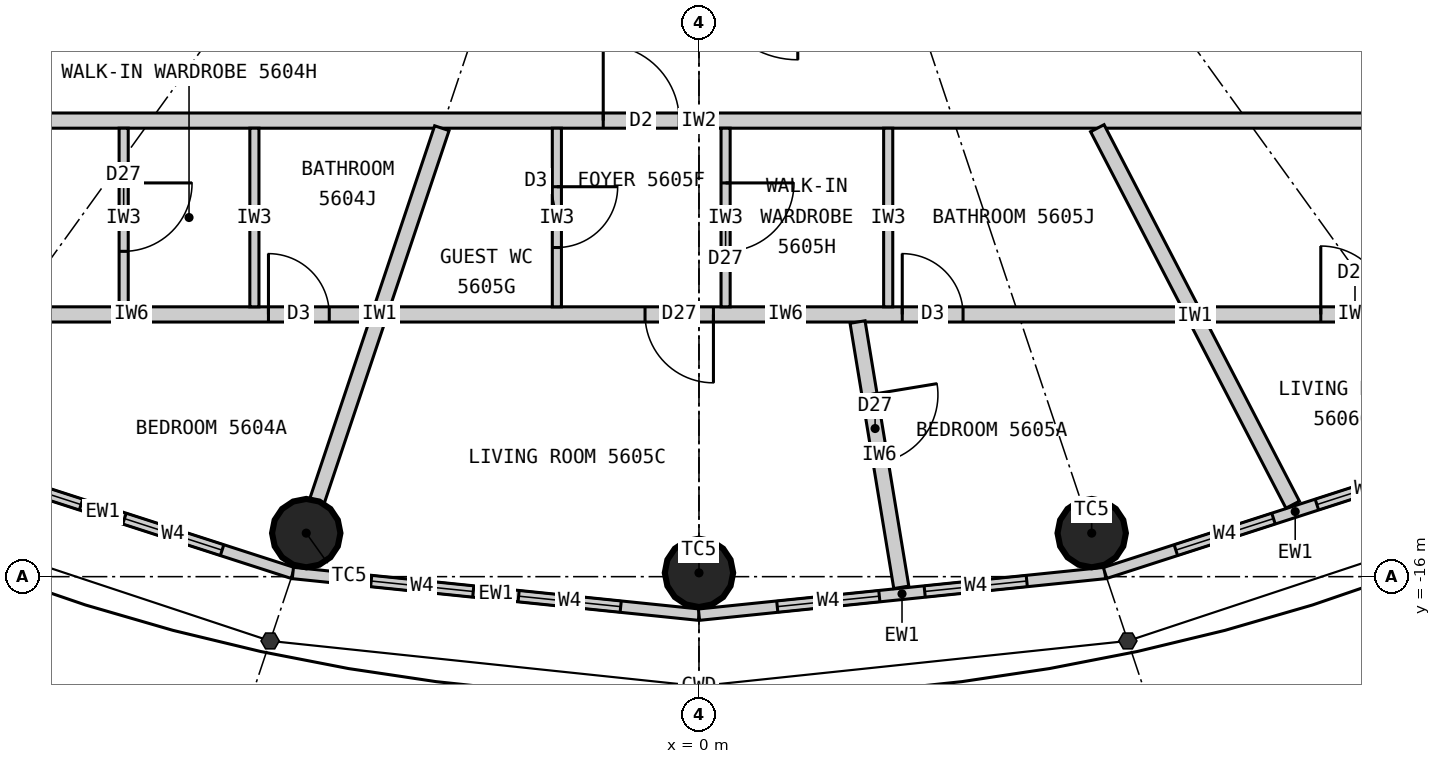
"""IFC4 building model, lengths in metres.
Left out: names, types, materials, properties, quantities, classifications, styles, units other than length and angle.
Written with IfcOpenShell. Run it as: python <this file> out.ifc"""

import sys

from ifc_helpers import new_model, si_unit, direction, frame, frame_2d, origin, origin_2d, place, context, subcontext, project, spatial, rectangle, circle, extrude, element, fill, save


model = new_model("IFC4")
c1 = context("Model", 3, precision=1e-05, world=origin(), true_north=direction((0.0, 1.0)))
c2 = subcontext(c1, "Body", "Model", "MODEL_VIEW")
j1 = project(units=[si_unit("LENGTHUNIT", "METRE"), si_unit("PLANEANGLEUNIT", "RADIAN")], contexts=[c1])
p1 = place(None, origin())
s1 = spatial("IfcSite", under=j1, at=p1, CompositionType="ELEMENT")
p2 = place(p1, origin())
s2 = spatial("IfcBuilding", under=s1, at=p2, CompositionType="ELEMENT")
p3 = place(p2, frame((0.0, 0.0, 209.4)))
s3 = spatial("IfcBuildingStorey", under=s2, at=p3, CompositionType="ELEMENT", Elevation=209.4)
for number, where, z_axis, x_axis in (
    (1, (-5.167, -15.427, 0.0), (0.0, 0.0, 1.0), (1.0, 0.0, 0.0)),
    (2, (0.0, -15.95, 0.0), (0.0, 0.0, 1.0), (1.0, 0.0, 0.0)),
    (3, (5.167, -15.427, 0.0), (0.0, 0.0, 1.0), (1.0, 0.0, 0.0)),
):
    element("IfcColumn", number, at=place(p3, frame(where, z_axis=z_axis, x_axis=x_axis)), inside=s3, PredefinedType="COLUMN", context=c2, shape_type="SweptSolid", body=[
        extrude(circle(Radius=0.45, at=origin_2d()), origin(), (0.0, 0.0, 1.0), 3.3),
    ])
p4 = place(p3, frame((-10.346, -14.336, 0.0), z_axis=(0.0, 0.0, 1.0), x_axis=(0.951644702515, -0.307200846638, 0.0)))
e4 = element("IfcWall", 4, at=p4, inside=s3, PredefinedType="ELEMENTEDWALL", context=c2, shape_type="SweptSolid", body=[
    extrude(rectangle(XDim=5.258, YDim=0.15, at=frame_2d((2.629, 0.0))), origin(), (0.0, 0.0, 1.0), 3.12),
])
p5 = place(p4, frame((0.979, 0.0, 0.9)))
e5 = element("IfcOpeningElement", 5, at=p5, cuts=e4, PredefinedType="OPENING", context=c2, shape_type="SweptSolid", body=[
    extrude(rectangle(XDim=1.35, YDim=1.9, at=frame_2d((0.675, 0.95))), frame((0.0, 0.085, 0.0), z_axis=(0.0, -1.0, 0.0), x_axis=(1.0, 0.0, 0.0)), (0.0, 0.0, 1.0), 0.17),
])
p6 = place(p4, frame((2.929, 0.0, 0.9)))
e6 = element("IfcOpeningElement", 6, at=p6, cuts=e4, PredefinedType="OPENING", context=c2, shape_type="SweptSolid", body=[
    extrude(rectangle(XDim=1.35, YDim=1.9, at=frame_2d((0.675, 0.95))), frame((0.0, 0.085, 0.0), z_axis=(0.0, -1.0, 0.0), x_axis=(1.0, 0.0, 0.0)), (0.0, 0.0, 1.0), 0.17),
])
p7 = place(p3, frame((-5.343, -15.952, 0.0), z_axis=(0.0, 0.0, 1.0), x_axis=(0.994774574972, -0.102095763818, 0.0)))
e7 = element("IfcWall", 7, at=p7, inside=s3, PredefinedType="ELEMENTEDWALL", context=c2, shape_type="SweptSolid", body=[
    extrude(rectangle(XDim=5.371, YDim=0.15, at=frame_2d((2.686, 0.0))), origin(), (0.0, 0.0, 1.0), 3.12),
])
p8 = place(p7, frame((1.035, 0.0, 0.9)))
e8 = element("IfcOpeningElement", 8, at=p8, cuts=e7, PredefinedType="OPENING", context=c2, shape_type="SweptSolid", body=[
    extrude(rectangle(XDim=1.35, YDim=1.9, at=frame_2d((0.675, 0.95))), frame((0.0, 0.085, 0.0), z_axis=(0.0, -1.0, 0.0), x_axis=(1.0, 0.0, 0.0)), (0.0, 0.0, 1.0), 0.17),
])
p9 = place(p7, frame((2.985, 0.0, 0.9)))
e9 = element("IfcOpeningElement", 9, at=p9, cuts=e7, PredefinedType="OPENING", context=c2, shape_type="SweptSolid", body=[
    extrude(rectangle(XDim=1.35, YDim=1.9, at=frame_2d((0.675, 0.95))), frame((0.0, 0.085, 0.0), z_axis=(0.0, -1.0, 0.0), x_axis=(1.0, 0.0, 0.0)), (0.0, 0.0, 1.0), 0.17),
])
p10 = place(p3, frame((0.0, -16.5, 0.0), z_axis=(0.0, 0.0, 1.0), x_axis=(0.994774574972, 0.102095763818, 0.0)))
e10 = element("IfcWall", 10, at=p10, inside=s3, PredefinedType="ELEMENTEDWALL", context=c2, shape_type="SweptSolid", body=[
    extrude(rectangle(XDim=5.371, YDim=0.15, at=frame_2d((2.686, 0.0))), origin(), (0.0, 0.0, 1.0), 3.12),
])
p11 = place(p10, frame((1.035, 0.0, 0.9)))
e11 = element("IfcOpeningElement", 11, at=p11, cuts=e10, PredefinedType="OPENING", context=c2, shape_type="SweptSolid", body=[
    extrude(rectangle(XDim=1.35, YDim=1.9, at=frame_2d((0.675, 0.95))), frame((0.0, 0.085, 0.0), z_axis=(0.0, -1.0, 0.0), x_axis=(1.0, 0.0, 0.0)), (0.0, 0.0, 1.0), 0.17),
])
p12 = place(p10, frame((2.985, 0.0, 0.9)))
e12 = element("IfcOpeningElement", 12, at=p12, cuts=e10, PredefinedType="OPENING", context=c2, shape_type="SweptSolid", body=[
    extrude(rectangle(XDim=1.35, YDim=1.9, at=frame_2d((0.675, 0.95))), frame((0.0, 0.085, 0.0), z_axis=(0.0, -1.0, 0.0), x_axis=(1.0, 0.0, 0.0)), (0.0, 0.0, 1.0), 0.17),
])
p13 = place(p3, frame((5.343, -15.952, 0.0), z_axis=(0.0, 0.0, 1.0), x_axis=(0.951644702515, 0.307200846638, 0.0)))
e13 = element("IfcWall", 13, at=p13, inside=s3, PredefinedType="ELEMENTEDWALL", context=c2, shape_type="SweptSolid", body=[
    extrude(rectangle(XDim=5.258, YDim=0.15, at=frame_2d((2.629, 0.0))), origin(), (0.0, 0.0, 1.0), 3.12),
])
p14 = place(p13, frame((0.979, 0.0, 0.9)))
e14 = element("IfcOpeningElement", 14, at=p14, cuts=e13, PredefinedType="OPENING", context=c2, shape_type="SweptSolid", body=[
    extrude(rectangle(XDim=1.35, YDim=1.9, at=frame_2d((0.675, 0.95))), frame((0.0, 0.085, 0.0), z_axis=(0.0, -1.0, 0.0), x_axis=(1.0, 0.0, 0.0)), (0.0, 0.0, 1.0), 0.17),
])
p15 = place(p13, frame((2.929, 0.0, 0.9)))
e15 = element("IfcOpeningElement", 15, at=p15, cuts=e13, PredefinedType="OPENING", context=c2, shape_type="SweptSolid", body=[
    extrude(rectangle(XDim=1.35, YDim=1.9, at=frame_2d((0.675, 0.95))), frame((0.0, 0.085, 0.0), z_axis=(0.0, -1.0, 0.0), x_axis=(1.0, 0.0, 0.0)), (0.0, 0.0, 1.0), 0.17),
])
p16 = place(p3, frame((11.1, -10.0, 0.0), z_axis=(0.0, 0.0, 1.0), x_axis=(-1.0, 0.0, 0.0)))
e16 = element("IfcWall", 16, at=p16, inside=s3, PredefinedType="PARTITIONING", context=c2, shape_type="SweptSolid", body=[
    extrude(rectangle(XDim=22.2, YDim=0.2, at=frame_2d((11.1, 0.0))), origin(), (0.0, 0.0, 1.0), 3.12),
])
p17 = place(p16, frame((11.36, 0.0, 0.0)))
e17 = element("IfcOpeningElement", 17, at=p17, cuts=e16, PredefinedType="OPENING", context=c2, shape_type="SweptSolid", body=[
    extrude(rectangle(XDim=1.0, YDim=2.2, at=frame_2d((0.5, 1.1))), frame((0.0, 0.11, 0.0), z_axis=(0.0, -1.0, 0.0), x_axis=(1.0, 0.0, 0.0)), (0.0, 0.0, 1.0), 0.22),
])
p18 = place(p16, frame((0.595, 0.0, 0.0)))
e18 = element("IfcOpeningElement", 18, at=p18, cuts=e16, PredefinedType="OPENING", context=c2, shape_type="SweptSolid", body=[
    extrude(rectangle(XDim=1.0, YDim=2.2, at=frame_2d((0.5, 1.1))), frame((0.0, 0.11, 0.0), z_axis=(0.0, -1.0, 0.0), x_axis=(1.0, 0.0, 0.0)), (0.0, 0.0, 1.0), 0.22),
])
p19 = place(p3, frame((-3.383, -10.1, 0.0), z_axis=(0.0, 0.0, 1.0), x_axis=(-0.317602151035, -0.948224063003, 0.0)))
e19 = element("IfcWall", 19, at=p19, inside=s3, PredefinedType="PARTITIONING", context=c2, shape_type="SweptSolid", body=[
    extrude(rectangle(XDim=5.168, YDim=0.2, at=frame_2d((2.584, 0.0))), origin(), (0.0, 0.0, 1.0), 2.42),
])
p20 = place(p3, frame((5.241, -10.1, 0.0), z_axis=(0.0, 0.0, 1.0), x_axis=(0.460603196597, -0.887606160008, 0.0)))
e20 = element("IfcWall", 20, at=p20, inside=s3, PredefinedType="PARTITIONING", context=c2, shape_type="SweptSolid", body=[
    extrude(rectangle(XDim=5.58, YDim=0.2, at=frame_2d((2.79, 0.0))), origin(), (0.0, 0.0, 1.0), 3.12),
])
p21 = place(p3, frame((-10.609, -12.55, 0.0), z_axis=(0.0, 0.0, 1.0), x_axis=(1.0, 0.0, 0.0)))
e21 = element("IfcWall", 21, at=p21, inside=s3, PredefinedType="PARTITIONING", context=c2, shape_type="SweptSolid", body=[
    extrude(rectangle(XDim=6.284, YDim=0.2, at=frame_2d((3.142, 0.0))), origin(), (0.0, 0.0, 1.0), 3.12),
])
p22 = place(p21, frame((4.944, 0.0, 0.0)))
e22 = element("IfcOpeningElement", 22, at=p22, cuts=e21, PredefinedType="OPENING", context=c2, shape_type="SweptSolid", body=[
    extrude(rectangle(XDim=0.8, YDim=2.1, at=frame_2d((0.4, 1.05))), frame((0.0, 0.11, 0.0), z_axis=(0.0, -1.0, 0.0), x_axis=(1.0, 0.0, 0.0)), (0.0, 0.0, 1.0), 0.22),
])
p23 = place(p3, frame((-7.569, -10.1, 0.0), z_axis=(0.0, 0.0, 1.0), x_axis=(0.0, -1.0, 0.0)))
e23 = element("IfcWall", 23, at=p23, inside=s3, PredefinedType="PARTITIONING", context=c2, shape_type="SweptSolid", body=[
    extrude(rectangle(XDim=2.35, YDim=0.12, at=frame_2d((1.175, 0.0))), origin(), (0.0, 0.0, 1.0), 3.12),
])
p24 = place(p23, frame((0.72, 0.0, 0.0)))
e24 = element("IfcOpeningElement", 24, at=p24, cuts=e23, PredefinedType="OPENING", context=c2, shape_type="SweptSolid", body=[
    extrude(rectangle(XDim=0.9, YDim=2.1, at=frame_2d((0.45, 1.05))), frame((0.0, 0.07, 0.0), z_axis=(0.0, -1.0, 0.0), x_axis=(1.0, 0.0, 0.0)), (0.0, 0.0, 1.0), 0.14),
])
p25 = place(p3, frame((-5.849, -10.1, 0.0), z_axis=(0.0, 0.0, 1.0), x_axis=(0.0, -1.0, 0.0)))
e25 = element("IfcWall", 25, at=p25, inside=s3, PredefinedType="PARTITIONING", context=c2, shape_type="SweptSolid", body=[
    extrude(rectangle(XDim=2.35, YDim=0.12, at=frame_2d((1.175, 0.0))), origin(), (0.0, 0.0, 1.0), 3.12),
])
p26 = place(p3, frame((-4.082, -12.55, 0.0), z_axis=(0.0, 0.0, 1.0), x_axis=(1.0, 0.0, 0.0)))
e26 = element("IfcWall", 26, at=p26, inside=s3, PredefinedType="PARTITIONING", context=c2, shape_type="SweptSolid", body=[
    extrude(rectangle(XDim=10.446, YDim=0.2, at=frame_2d((5.223, 0.0))), origin(), (0.0, 0.0, 1.0), 3.12),
])
p27 = place(p26, frame((6.757, 0.0, 0.0)))
e27 = element("IfcOpeningElement", 27, at=p27, cuts=e26, PredefinedType="OPENING", context=c2, shape_type="SweptSolid", body=[
    extrude(rectangle(XDim=0.8, YDim=2.1, at=frame_2d((0.4, 1.05))), frame((0.0, 0.11, 0.0), z_axis=(0.0, -1.0, 0.0), x_axis=(1.0, 0.0, 0.0)), (0.0, 0.0, 1.0), 0.22),
])
p28 = place(p26, frame((3.372, 0.0, 0.0)))
e28 = element("IfcOpeningElement", 28, at=p28, cuts=e26, PredefinedType="OPENING", context=c2, shape_type="SweptSolid", body=[
    extrude(rectangle(XDim=0.9, YDim=2.1, at=frame_2d((0.45, 1.05))), frame((0.0, 0.11, 0.0), z_axis=(0.0, -1.0, 0.0), x_axis=(1.0, 0.0, 0.0)), (0.0, 0.0, 1.0), 0.22),
])
p29 = place(p3, frame((2.086, -12.65, 0.0), z_axis=(0.0, 0.0, 1.0), x_axis=(0.162664077359, -0.986681507852, 0.0)))
e29 = element("IfcWall", 29, at=p29, inside=s3, PredefinedType="PARTITIONING", context=c2, shape_type="SweptSolid", body=[
    extrude(rectangle(XDim=3.538, YDim=0.2, at=frame_2d((1.769, 0.0))), origin(), (0.0, 0.0, 1.0), 3.12),
])
p30 = place(p29, frame((0.97, 0.0, 0.0)))
e30 = element("IfcOpeningElement", 30, at=p30, cuts=e29, PredefinedType="OPENING", context=c2, shape_type="SweptSolid", body=[
    extrude(rectangle(XDim=0.9, YDim=2.1, at=frame_2d((0.45, 1.05))), frame((0.0, 0.11, 0.0), z_axis=(0.0, -1.0, 0.0), x_axis=(1.0, 0.0, 0.0)), (0.0, 0.0, 1.0), 0.22),
])
p31 = place(p3, frame((-1.87, -10.1, 0.0), z_axis=(0.0, 0.0, 1.0), x_axis=(0.0, -1.0, 0.0)))
e31 = element("IfcWall", 31, at=p31, inside=s3, PredefinedType="PARTITIONING", context=c2, shape_type="SweptSolid", body=[
    extrude(rectangle(XDim=2.35, YDim=0.12, at=frame_2d((1.175, 0.0))), origin(), (0.0, 0.0, 1.0), 3.12),
])
p32 = place(p31, frame((0.77, 0.0, 0.0)))
e32 = element("IfcOpeningElement", 32, at=p32, cuts=e31, PredefinedType="OPENING", context=c2, shape_type="SweptSolid", body=[
    extrude(rectangle(XDim=0.8, YDim=2.1, at=frame_2d((0.4, 1.05))), frame((0.0, 0.07, 0.0), z_axis=(0.0, -1.0, 0.0), x_axis=(1.0, 0.0, 0.0)), (0.0, 0.0, 1.0), 0.14),
])
p33 = place(p3, frame((0.35, -10.1, 0.0), z_axis=(0.0, 0.0, 1.0), x_axis=(0.0, -1.0, 0.0)))
e33 = element("IfcWall", 33, at=p33, inside=s3, PredefinedType="PARTITIONING", context=c2, shape_type="SweptSolid", body=[
    extrude(rectangle(XDim=2.35, YDim=0.12, at=frame_2d((1.175, 0.0))), origin(), (0.0, 0.0, 1.0), 3.12),
])
p34 = place(p33, frame((0.72, 0.0, 0.0)))
e34 = element("IfcOpeningElement", 34, at=p34, cuts=e33, PredefinedType="OPENING", context=c2, shape_type="SweptSolid", body=[
    extrude(rectangle(XDim=0.9, YDim=2.1, at=frame_2d((0.45, 1.05))), frame((0.0, 0.07, 0.0), z_axis=(0.0, -1.0, 0.0), x_axis=(1.0, 0.0, 0.0)), (0.0, 0.0, 1.0), 0.14),
])
p35 = place(p3, frame((2.49, -10.1, 0.0), z_axis=(0.0, 0.0, 1.0), x_axis=(0.0, -1.0, 0.0)))
e35 = element("IfcWall", 35, at=p35, inside=s3, PredefinedType="PARTITIONING", context=c2, shape_type="SweptSolid", body=[
    extrude(rectangle(XDim=2.35, YDim=0.12, at=frame_2d((1.175, 0.0))), origin(), (0.0, 0.0, 1.0), 3.12),
])
p36 = place(p3, frame((6.661, -12.55, 0.0), z_axis=(0.0, 0.0, 1.0), x_axis=(1.0, 0.0, 0.0)))
e36 = element("IfcWall", 36, at=p36, inside=s3, PredefinedType="PARTITIONING", context=c2, shape_type="SweptSolid", body=[
    extrude(rectangle(XDim=3.947, YDim=0.2, at=frame_2d((1.974, 0.0))), origin(), (0.0, 0.0, 1.0), 3.12),
])
p37 = place(p36, frame((1.52, 0.0, 0.0)))
e37 = element("IfcOpeningElement", 37, at=p37, cuts=e36, PredefinedType="OPENING", context=c2, shape_type="SweptSolid", body=[
    extrude(rectangle(XDim=0.9, YDim=2.1, at=frame_2d((0.45, 1.05))), frame((0.0, 0.11, 0.0), z_axis=(0.0, -1.0, 0.0), x_axis=(1.0, 0.0, 0.0)), (0.0, 0.0, 1.0), 0.22),
])
p38 = place(p5, origin())
e38 = element("IfcWindow", 38, at=p38, inside=s3, PartitioningType="SINGLE_PANEL", PredefinedType="WINDOW", context=c2, shape_type="SweptSolid", body=[
    extrude(rectangle(XDim=1.35, YDim=1.9, at=frame_2d((0.675, 0.95))), frame((0.0, 0.03, 0.0), z_axis=(0.0, -1.0, 0.0), x_axis=(1.0, 0.0, 0.0)), (0.0, 0.0, 1.0), 0.06),
])
fill(e5, e38)
p39 = place(p6, origin())
e39 = element("IfcWindow", 39, at=p39, inside=s3, PartitioningType="SINGLE_PANEL", PredefinedType="WINDOW", context=c2, shape_type="SweptSolid", body=[
    extrude(rectangle(XDim=1.35, YDim=1.9, at=frame_2d((0.675, 0.95))), frame((0.0, 0.03, 0.0), z_axis=(0.0, -1.0, 0.0), x_axis=(1.0, 0.0, 0.0)), (0.0, 0.0, 1.0), 0.06),
])
fill(e6, e39)
p40 = place(p8, origin())
e40 = element("IfcWindow", 40, at=p40, inside=s3, PartitioningType="SINGLE_PANEL", PredefinedType="WINDOW", context=c2, shape_type="SweptSolid", body=[
    extrude(rectangle(XDim=1.35, YDim=1.9, at=frame_2d((0.675, 0.95))), frame((0.0, 0.03, 0.0), z_axis=(0.0, -1.0, 0.0), x_axis=(1.0, 0.0, 0.0)), (0.0, 0.0, 1.0), 0.06),
])
fill(e8, e40)
p41 = place(p9, origin())
e41 = element("IfcWindow", 41, at=p41, inside=s3, PartitioningType="SINGLE_PANEL", PredefinedType="WINDOW", context=c2, shape_type="SweptSolid", body=[
    extrude(rectangle(XDim=1.35, YDim=1.9, at=frame_2d((0.675, 0.95))), frame((0.0, 0.03, 0.0), z_axis=(0.0, -1.0, 0.0), x_axis=(1.0, 0.0, 0.0)), (0.0, 0.0, 1.0), 0.06),
])
fill(e9, e41)
p42 = place(p11, origin())
e42 = element("IfcWindow", 42, at=p42, inside=s3, PartitioningType="SINGLE_PANEL", PredefinedType="WINDOW", context=c2, shape_type="SweptSolid", body=[
    extrude(rectangle(XDim=1.35, YDim=1.9, at=frame_2d((0.675, 0.95))), frame((0.0, 0.03, 0.0), z_axis=(0.0, -1.0, 0.0), x_axis=(1.0, 0.0, 0.0)), (0.0, 0.0, 1.0), 0.06),
])
fill(e11, e42)
p43 = place(p12, origin())
e43 = element("IfcWindow", 43, at=p43, inside=s3, PartitioningType="SINGLE_PANEL", PredefinedType="WINDOW", context=c2, shape_type="SweptSolid", body=[
    extrude(rectangle(XDim=1.35, YDim=1.9, at=frame_2d((0.675, 0.95))), frame((0.0, 0.03, 0.0), z_axis=(0.0, -1.0, 0.0), x_axis=(1.0, 0.0, 0.0)), (0.0, 0.0, 1.0), 0.06),
])
fill(e12, e43)
p44 = place(p14, origin())
e44 = element("IfcWindow", 44, at=p44, inside=s3, PartitioningType="SINGLE_PANEL", PredefinedType="WINDOW", context=c2, shape_type="SweptSolid", body=[
    extrude(rectangle(XDim=1.35, YDim=1.9, at=frame_2d((0.675, 0.95))), frame((0.0, 0.03, 0.0), z_axis=(0.0, -1.0, 0.0), x_axis=(1.0, 0.0, 0.0)), (0.0, 0.0, 1.0), 0.06),
])
fill(e14, e44)
p45 = place(p15, origin())
e45 = element("IfcWindow", 45, at=p45, inside=s3, PartitioningType="SINGLE_PANEL", PredefinedType="WINDOW", context=c2, shape_type="SweptSolid", body=[
    extrude(rectangle(XDim=1.35, YDim=1.9, at=frame_2d((0.675, 0.95))), frame((0.0, 0.03, 0.0), z_axis=(0.0, -1.0, 0.0), x_axis=(1.0, 0.0, 0.0)), (0.0, 0.0, 1.0), 0.06),
])
fill(e15, e45)
p46 = place(p24, origin())
e46 = element("IfcDoor", 46, at=p46, inside=s3, OperationType="SINGLE_SWING_LEFT", PredefinedType="DOOR", context=c2, shape_type="SweptSolid", body=[
    extrude(rectangle(XDim=0.9, YDim=2.1, at=frame_2d((0.45, 1.05))), frame((0.0, 0.025, 0.0), z_axis=(0.0, -1.0, 0.0), x_axis=(1.0, 0.0, 0.0)), (0.0, 0.0, 1.0), 0.05),
])
fill(e24, e46)
p47 = place(p22, origin())
e47 = element("IfcDoor", 47, at=p47, inside=s3, OperationType="SINGLE_SWING_LEFT", PredefinedType="DOOR", context=c2, shape_type="SweptSolid", body=[
    extrude(rectangle(XDim=0.8, YDim=2.1, at=frame_2d((0.4, 1.05))), frame((0.0, 0.025, 0.0), z_axis=(0.0, -1.0, 0.0), x_axis=(1.0, 0.0, 0.0)), (0.0, 0.0, 1.0), 0.05),
])
fill(e22, e47)
p48 = place(p17, origin())
e48 = element("IfcDoor", 48, at=p48, inside=s3, OperationType="SINGLE_SWING_RIGHT", PredefinedType="DOOR", context=c2, shape_type="SweptSolid", body=[
    extrude(rectangle(XDim=1.0, YDim=2.2, at=frame_2d((0.5, 1.1))), frame((0.0, 0.025, 0.0), z_axis=(0.0, -1.0, 0.0), x_axis=(1.0, 0.0, 0.0)), (0.0, 0.0, 1.0), 0.05),
])
fill(e17, e48)
p49 = place(p32, origin())
e49 = element("IfcDoor", 49, at=p49, inside=s3, OperationType="SINGLE_SWING_LEFT", PredefinedType="DOOR", context=c2, shape_type="SweptSolid", body=[
    extrude(rectangle(XDim=0.8, YDim=2.1, at=frame_2d((0.4, 1.05))), frame((0.0, 0.025, 0.0), z_axis=(0.0, -1.0, 0.0), x_axis=(1.0, 0.0, 0.0)), (0.0, 0.0, 1.0), 0.05),
])
fill(e32, e49)
p50 = place(p34, origin())
e50 = element("IfcDoor", 50, at=p50, inside=s3, OperationType="SINGLE_SWING_LEFT", PredefinedType="DOOR", context=c2, shape_type="SweptSolid", body=[
    extrude(rectangle(XDim=0.9, YDim=2.1, at=frame_2d((0.45, 1.05))), frame((0.0, 0.025, 0.0), z_axis=(0.0, -1.0, 0.0), x_axis=(1.0, 0.0, 0.0)), (0.0, 0.0, 1.0), 0.05),
])
fill(e34, e50)
p51 = place(p27, origin())
e51 = element("IfcDoor", 51, at=p51, inside=s3, OperationType="SINGLE_SWING_LEFT", PredefinedType="DOOR", context=c2, shape_type="SweptSolid", body=[
    extrude(rectangle(XDim=0.8, YDim=2.1, at=frame_2d((0.4, 1.05))), frame((0.0, 0.025, 0.0), z_axis=(0.0, -1.0, 0.0), x_axis=(1.0, 0.0, 0.0)), (0.0, 0.0, 1.0), 0.05),
])
fill(e27, e51)
p52 = place(p28, origin())
e52 = element("IfcDoor", 52, at=p52, inside=s3, OperationType="SINGLE_SWING_RIGHT", PredefinedType="DOOR", context=c2, shape_type="SweptSolid", body=[
    extrude(rectangle(XDim=0.9, YDim=2.1, at=frame_2d((0.45, 1.05))), frame((0.0, 0.025, 0.0), z_axis=(0.0, -1.0, 0.0), x_axis=(1.0, 0.0, 0.0)), (0.0, 0.0, 1.0), 0.05),
])
fill(e28, e52)
p53 = place(p30, origin())
e53 = element("IfcDoor", 53, at=p53, inside=s3, OperationType="SINGLE_SWING_LEFT", PredefinedType="DOOR", context=c2, shape_type="SweptSolid", body=[
    extrude(rectangle(XDim=0.9, YDim=2.1, at=frame_2d((0.45, 1.05))), frame((0.0, 0.025, 0.0), z_axis=(0.0, -1.0, 0.0), x_axis=(1.0, 0.0, 0.0)), (0.0, 0.0, 1.0), 0.05),
])
fill(e30, e53)
p54 = place(p37, origin())
e54 = element("IfcDoor", 54, at=p54, inside=s3, OperationType="SINGLE_SWING_LEFT", PredefinedType="DOOR", context=c2, shape_type="SweptSolid", body=[
    extrude(rectangle(XDim=0.9, YDim=2.1, at=frame_2d((0.45, 1.05))), frame((0.0, 0.025, 0.0), z_axis=(0.0, -1.0, 0.0), x_axis=(1.0, 0.0, 0.0)), (0.0, 0.0, 1.0), 0.05),
])
fill(e37, e54)
save(model, sys.argv[1])
